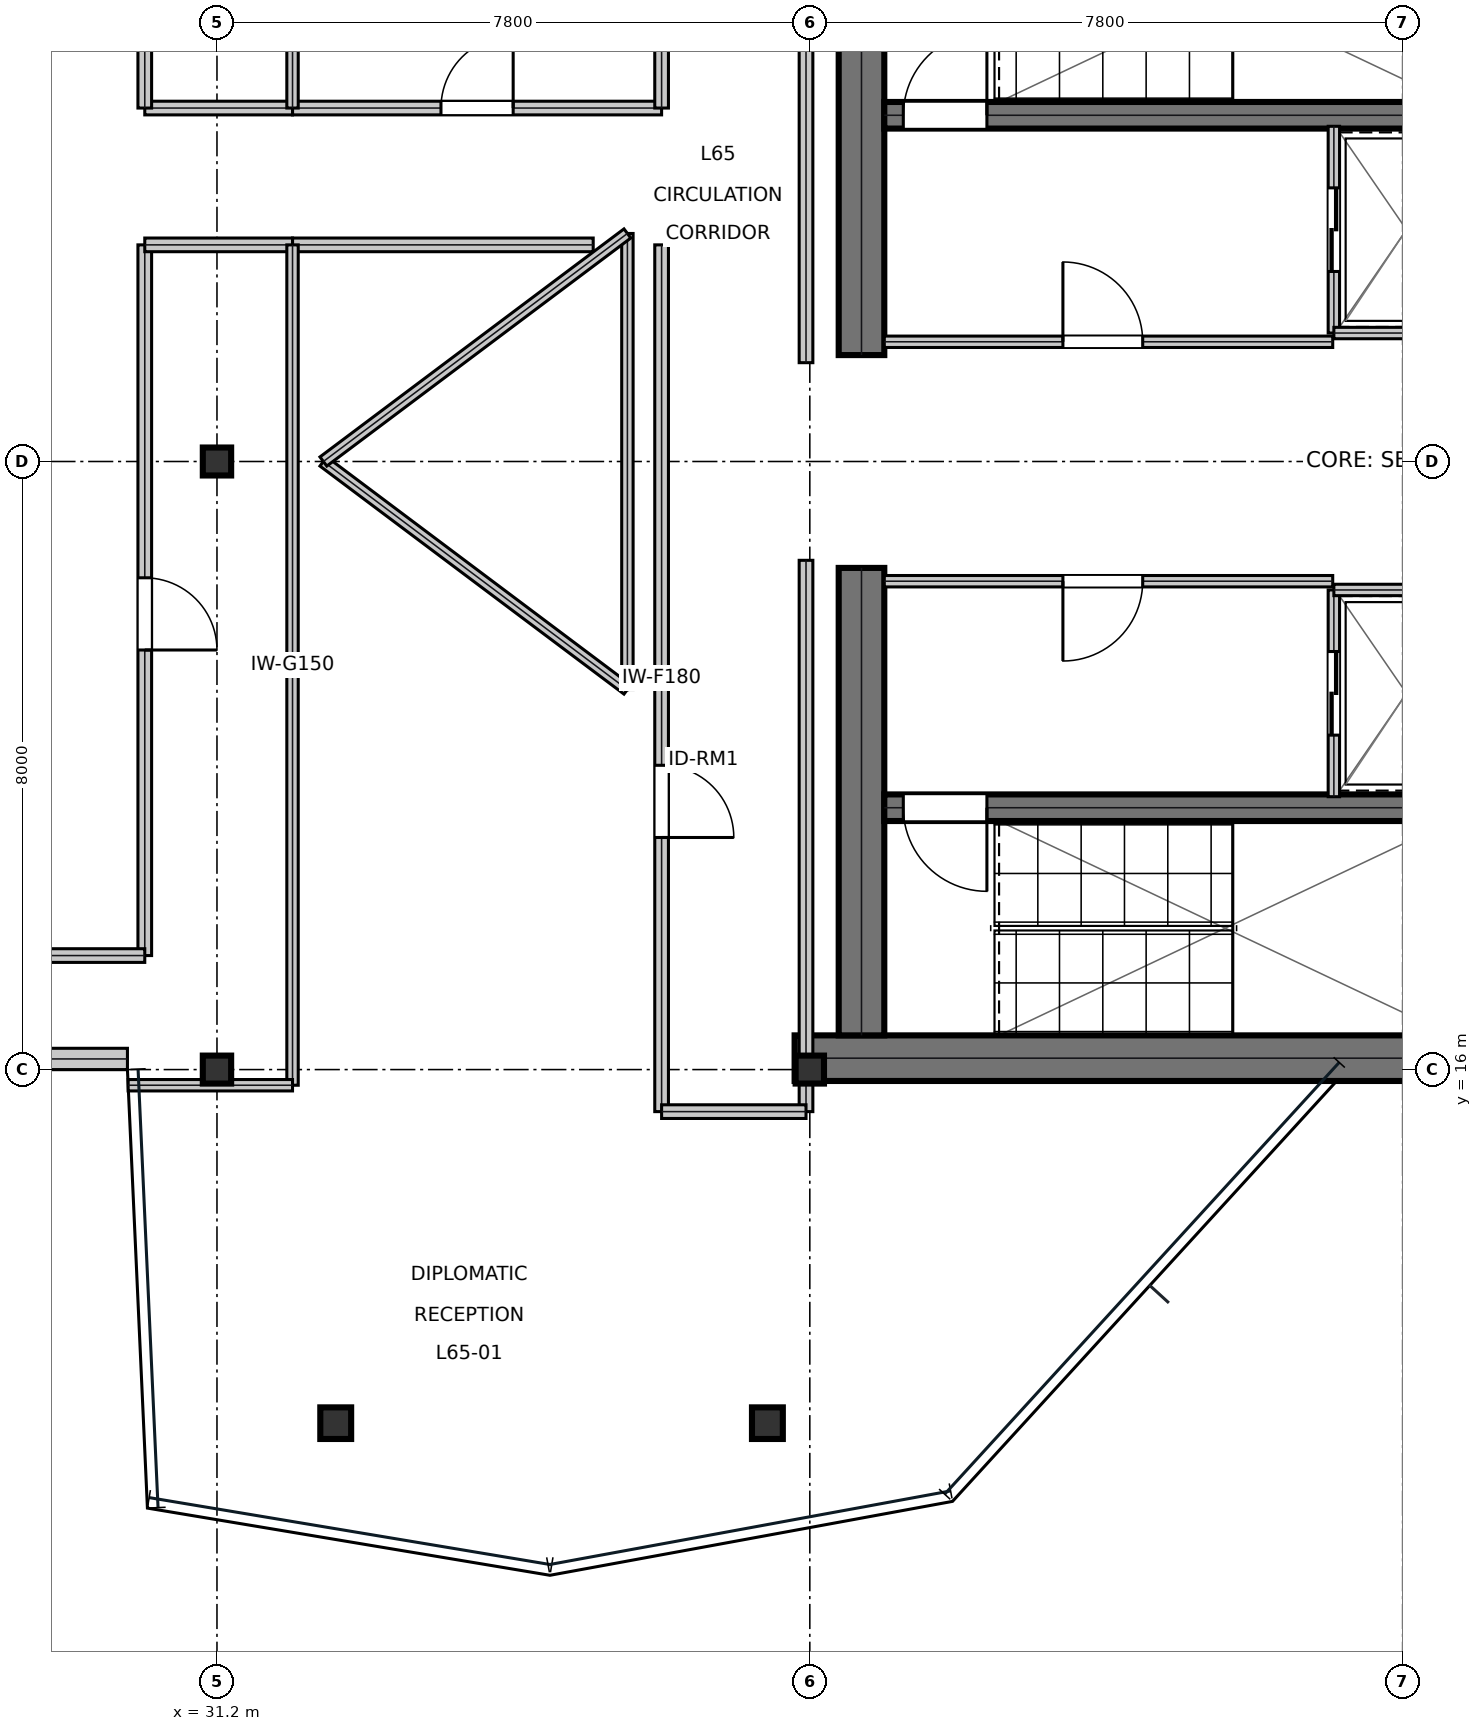
"""IFC4 building model, lengths in metres.
Left out: names, types, materials, properties, quantities, classifications, styles, units other than length and angle.
Written with IfcOpenShell. Run it as: python <this file> out.ifc"""

import sys

from ifc_helpers import new_model, si_unit, direction, frame, frame_2d, origin, origin_2d, place, context, subcontext, project, spatial, rectangle, i_section, extrude, element, fill, save


model = new_model("IFC4")
c1 = context("Model", 3, precision=1e-05, world=origin(), true_north=direction((0.0, 1.0)))
c2 = subcontext(c1, "Body", "Model", "MODEL_VIEW")
j1 = project(units=[si_unit("LENGTHUNIT", "METRE"), si_unit("PLANEANGLEUNIT", "RADIAN")], contexts=[c1])
p1 = place(None, origin())
s1 = spatial("IfcSite", under=j1, at=p1, CompositionType="ELEMENT")
p2 = place(p1, origin())
s2 = spatial("IfcBuilding", under=s1, at=p2, CompositionType="ELEMENT")
p3 = place(p2, frame((0.0, 0.0, 279.0)))
s3 = spatial("IfcBuildingStorey", under=s2, at=p3, CompositionType="ELEMENT", Elevation=279.0)
p4 = place(p3, frame((38.8, 16.15, 0.0), z_axis=(0.0, 0.0, 1.0), x_axis=(1.0, 0.0, 0.0)))
e1 = element("IfcWall", 1, at=p4, inside=s3, PredefinedType="SHEAR", context=c2, shape_type="SweptSolid", body=[
    extrude(rectangle(XDim=16.0, YDim=0.6, at=frame_2d((8.0, 0.0))), origin(), (0.0, 0.0, 1.0), 3.81),
])
for number, where, z_axis, x_axis in (
    (2, (39.68, 16.45, 0.0), (0.0, 0.0, 1.0), (0.0, 1.0, 0.0)),
    (3, (39.68, 25.4, 0.0), (0.0, 0.0, 1.0), (0.0, 1.0, 0.0)),
):
    element("IfcWall", number, at=place(p3, frame(where, z_axis=z_axis, x_axis=x_axis)), inside=s3, PredefinedType="SHEAR", context=c2, shape_type="SweptSolid", body=[
        extrude(rectangle(XDim=6.15, YDim=0.6, at=frame_2d((3.075, 0.0))), origin(), (0.0, 0.0, 1.0), 3.81),
    ])
p5 = place(p3, frame((39.98, 28.555, 0.0), z_axis=(0.0, 0.0, 1.0), x_axis=(1.0, 0.0, 0.0)))
e4 = element("IfcWall", 4, at=p5, inside=s3, PredefinedType="SHEAR", context=c2, shape_type="SweptSolid", body=[
    extrude(rectangle(XDim=7.71, YDim=0.35, at=frame_2d((3.855, 0.0))), origin(), (0.0, 0.0, 1.0), 3.81),
])
p6 = place(p5, frame((0.25, 0.0, 0.0)))
e5 = element("IfcOpeningElement", 5, at=p6, cuts=e4, PredefinedType="OPENING", context=c2, shape_type="SweptSolid", body=[
    extrude(rectangle(XDim=1.1, YDim=2.15, at=frame_2d((0.55, 1.075))), frame((0.0, 0.185, 0.0), z_axis=(0.0, -1.0, 0.0), x_axis=(1.0, 0.0, 0.0)), (0.0, 0.0, 1.0), 0.37),
])
p7 = place(p3, frame((39.98, 19.445, 0.0), z_axis=(0.0, 0.0, 1.0), x_axis=(1.0, 0.0, 0.0)))
e6 = element("IfcWall", 6, at=p7, inside=s3, PredefinedType="SHEAR", context=c2, shape_type="SweptSolid", body=[
    extrude(rectangle(XDim=7.71, YDim=0.35, at=frame_2d((3.855, 0.0))), origin(), (0.0, 0.0, 1.0), 3.81),
])
p8 = place(p7, frame((0.25, 0.0, 0.0)))
e7 = element("IfcOpeningElement", 7, at=p8, cuts=e6, PredefinedType="OPENING", context=c2, shape_type="SweptSolid", body=[
    extrude(rectangle(XDim=1.1, YDim=2.15, at=frame_2d((0.55, 1.075))), frame((0.0, 0.185, 0.0), z_axis=(0.0, -1.0, 0.0), x_axis=(1.0, 0.0, 0.0)), (0.0, 0.0, 1.0), 0.37),
])
for number, where, z_axis, x_axis in (
    (8, (31.2, 16.0, 0.0), (0.0, 0.0, 1.0), (1.0, 0.0, 0.0)),
    (9, (31.2, 24.0, 0.0), (0.0, 0.0, 1.0), (1.0, 0.0, 0.0)),
    (10, (39.0, 16.0, 0.0), (0.0, 0.0, 1.0), (1.0, 0.0, 0.0)),
):
    element("IfcColumn", number, at=place(p3, frame(where, z_axis=z_axis, x_axis=x_axis)), inside=s3, PredefinedType="COLUMN", context=c2, shape_type="SweptSolid", body=[
        extrude(i_section(OverallWidth=0.373, OverallDepth=0.368, WebThickness=0.015, FlangeThickness=0.024, at=origin_2d()), origin(), (0.0, 0.0, 1.0), 4.044),
    ])
for number, where, z_axis, x_axis in (
    (11, (32.762, 11.348, 0.016), (0.0, 0.0, 1.0), (1.0, 0.0, 0.0)),
    (12, (38.442, 11.348, 0.016), (0.0, 0.0, 1.0), (1.0, 0.0, 0.0)),
):
    element("IfcColumn", number, at=place(p3, frame(where, z_axis=z_axis, x_axis=x_axis)), inside=s3, PredefinedType="COLUMN", context=c2, shape_type="SweptSolid", body=[
        extrude(i_section(OverallWidth=0.406, OverallDepth=0.416, WebThickness=0.03, FlangeThickness=0.048, at=origin_2d()), origin(), (0.0, 0.0, 1.0), 4.018),
    ])
p9 = place(p3, frame((27.186, 16.14, 0.0), z_axis=(0.0, 0.0, 1.0), x_axis=(1.0, 0.0, 0.0)))
e13 = element("IfcWall", 13, at=p9, inside=s3, PredefinedType="STANDARD", context=c2, shape_type="SweptSolid", body=[
    extrude(rectangle(XDim=2.836, YDim=0.28, at=frame_2d((1.418, 0.0))), origin(), (0.0, 0.0, 1.0), 3.81),
])
p10 = place(p3, frame((39.98, 25.575, 0.0), z_axis=(0.0, 0.0, 1.0), x_axis=(1.0, 0.0, 0.0)))
e14 = element("IfcWall", 14, at=p10, inside=s3, PredefinedType="PARTITIONING", context=c2, shape_type="SweptSolid", body=[
    extrude(rectangle(XDim=5.9, YDim=0.15, at=frame_2d((2.95, 0.0))), origin(), (0.0, 0.0, 1.0), 3.81),
])
p11 = place(p10, frame((2.35, 0.0, 0.0)))
e15 = element("IfcOpeningElement", 15, at=p11, cuts=e14, PredefinedType="OPENING", context=c2, shape_type="SweptSolid", body=[
    extrude(rectangle(XDim=1.05, YDim=2.15, at=frame_2d((0.525, 1.075))), frame((0.0, 0.085, 0.0), z_axis=(0.0, -1.0, 0.0), x_axis=(1.0, 0.0, 0.0)), (0.0, 0.0, 1.0), 0.17),
])
p12 = place(p3, frame((39.98, 22.425, 0.0), z_axis=(0.0, 0.0, 1.0), x_axis=(1.0, 0.0, 0.0)))
e16 = element("IfcWall", 16, at=p12, inside=s3, PredefinedType="PARTITIONING", context=c2, shape_type="SweptSolid", body=[
    extrude(rectangle(XDim=5.9, YDim=0.15, at=frame_2d((2.95, 0.0))), origin(), (0.0, 0.0, 1.0), 3.81),
])
p13 = place(p12, frame((2.35, 0.0, 0.0)))
e17 = element("IfcOpeningElement", 17, at=p13, cuts=e16, PredefinedType="OPENING", context=c2, shape_type="SweptSolid", body=[
    extrude(rectangle(XDim=1.05, YDim=2.15, at=frame_2d((0.525, 1.075))), frame((0.0, 0.085, 0.0), z_axis=(0.0, -1.0, 0.0), x_axis=(1.0, 0.0, 0.0)), (0.0, 0.0, 1.0), 0.17),
])
p14 = place(p3, frame((45.895, 25.69, 0.0), z_axis=(0.0, 0.0, 1.0), x_axis=(0.0, 1.0, 0.0)))
e18 = element("IfcWall", 18, at=p14, inside=s3, PredefinedType="PARTITIONING", context=c2, shape_type="SweptSolid", body=[
    extrude(rectangle(XDim=2.72, YDim=0.15, at=frame_2d((1.36, 0.0))), origin(), (0.0, 0.0, 1.0), 3.81),
])
p15 = place(p14, frame((0.81, 0.0, 0.0)))
e19 = element("IfcOpeningElement", 19, at=p15, cuts=e18, PredefinedType="OPENING", context=c2, shape_type="SweptSolid", body=[
    extrude(rectangle(XDim=1.1, YDim=2.15, at=frame_2d((0.55, 1.075))), frame((0.0, 0.085, 0.0), z_axis=(0.0, -1.0, 0.0), x_axis=(1.0, 0.0, 0.0)), (0.0, 0.0, 1.0), 0.17),
])
p16 = place(p3, frame((45.895, 25.69, 0.0), z_axis=(0.0, 0.0, 1.0), x_axis=(1.0, 0.0, 0.0)))
e20 = element("IfcWall", 20, at=p16, inside=s3, PredefinedType="PARTITIONING", context=c2, shape_type="SweptSolid", body=[
    extrude(rectangle(XDim=1.915, YDim=0.15, at=frame_2d((0.958, 0.0))), origin(), (0.0, 0.0, 1.0), 3.81),
])
p17 = place(p3, frame((45.895, 19.59, 0.0), z_axis=(0.0, 0.0, 1.0), x_axis=(0.0, 1.0, 0.0)))
e21 = element("IfcWall", 21, at=p17, inside=s3, PredefinedType="PARTITIONING", context=c2, shape_type="SweptSolid", body=[
    extrude(rectangle(XDim=2.72, YDim=0.15, at=frame_2d((1.36, 0.0))), origin(), (0.0, 0.0, 1.0), 3.81),
])
p18 = place(p17, frame((0.81, 0.0, 0.0)))
e22 = element("IfcOpeningElement", 22, at=p18, cuts=e21, PredefinedType="OPENING", context=c2, shape_type="SweptSolid", body=[
    extrude(rectangle(XDim=1.1, YDim=2.15, at=frame_2d((0.55, 1.075))), frame((0.0, 0.085, 0.0), z_axis=(0.0, -1.0, 0.0), x_axis=(1.0, 0.0, 0.0)), (0.0, 0.0, 1.0), 0.17),
])
p19 = place(p3, frame((45.895, 22.31, 0.0), z_axis=(0.0, 0.0, 1.0), x_axis=(1.0, 0.0, 0.0)))
e23 = element("IfcWall", 23, at=p19, inside=s3, PredefinedType="PARTITIONING", context=c2, shape_type="SweptSolid", body=[
    extrude(rectangle(XDim=1.915, YDim=0.15, at=frame_2d((0.958, 0.0))), origin(), (0.0, 0.0, 1.0), 3.81),
])
p20 = place(p3, frame((37.05, 15.447, 0.0), z_axis=(0.0, 0.0, 1.0), x_axis=(0.0, 1.0, 0.0)))
e24 = element("IfcWall", 24, at=p20, inside=s3, PredefinedType="SOLIDWALL", context=c2, shape_type="SweptSolid", body=[
    extrude(rectangle(XDim=11.403, YDim=0.18, at=frame_2d((5.702, 0.0))), origin(), (0.0, 0.0, 1.0), 3.27),
])
p21 = place(p20, frame((3.607, 0.0, 0.0)))
e25 = element("IfcOpeningElement", 25, at=p21, cuts=e24, PredefinedType="OPENING", context=c2, shape_type="SweptSolid", body=[
    extrude(rectangle(XDim=0.95, YDim=2.15, at=frame_2d((0.475, 1.075))), frame((0.0, 0.1, 0.0), z_axis=(0.0, -1.0, 0.0), x_axis=(1.0, 0.0, 0.0)), (0.0, 0.0, 1.0), 0.2),
])
p22 = place(p3, frame((30.25, 17.5, 0.0), z_axis=(0.0, 0.0, 1.0), x_axis=(0.0, 1.0, 0.0)))
e26 = element("IfcWall", 26, at=p22, inside=s3, PredefinedType="SOLIDWALL", context=c2, shape_type="SweptSolid", body=[
    extrude(rectangle(XDim=9.35, YDim=0.18, at=frame_2d((4.675, 0.0))), origin(), (0.0, 0.0, 1.0), 3.27),
])
p23 = place(p22, frame((4.02, 0.0, 0.0)))
e27 = element("IfcOpeningElement", 27, at=p23, cuts=e26, PredefinedType="OPENING", context=c2, shape_type="SweptSolid", body=[
    extrude(rectangle(XDim=0.95, YDim=2.15, at=frame_2d((0.475, 1.075))), frame((0.0, 0.1, 0.0), z_axis=(0.0, -1.0, 0.0), x_axis=(1.0, 0.0, 0.0)), (0.0, 0.0, 1.0), 0.2),
])
p24 = place(p3, frame((32.194, 28.65, 0.0), z_axis=(0.0, 0.0, 1.0), x_axis=(1.0, 0.0, 0.0)))
e28 = element("IfcWall", 28, at=p24, inside=s3, PredefinedType="SOLIDWALL", context=c2, shape_type="SweptSolid", body=[
    extrude(rectangle(XDim=4.856, YDim=0.18, at=frame_2d((2.428, 0.0))), origin(), (0.0, 0.0, 1.0), 3.81),
])
p25 = place(p24, frame((1.953, 0.0, 0.0)))
e29 = element("IfcOpeningElement", 29, at=p25, cuts=e28, PredefinedType="OPENING", context=c2, shape_type="SweptSolid", body=[
    extrude(rectangle(XDim=0.95, YDim=2.15, at=frame_2d((0.475, 1.075))), frame((0.0, 0.1, 0.0), z_axis=(0.0, -1.0, 0.0), x_axis=(1.0, 0.0, 0.0)), (0.0, 0.0, 1.0), 0.2),
])
p26 = place(p3, frame((38.95, 15.447, 0.0), z_axis=(0.0, 0.0, 1.0), x_axis=(0.0, 1.0, 0.0)))
e30 = element("IfcWall", 30, at=p26, inside=s3, PredefinedType="SOLIDWALL", context=c2, shape_type="SweptSolid", body=[
    extrude(rectangle(XDim=7.253, YDim=0.18, at=frame_2d((3.626, 0.0))), origin(), (0.0, 0.0, 1.0), 3.27),
])
p27 = place(p3, frame((32.194, 26.85, 0.0), z_axis=(0.0, 0.0, 1.0), x_axis=(1.0, 0.0, 0.0)))
e31 = element("IfcWall", 31, at=p27, inside=s3, PredefinedType="SOLIDWALL", context=c2, shape_type="SweptSolid", body=[
    extrude(rectangle(XDim=3.956, YDim=0.18, at=frame_2d((1.978, 0.0))), origin(), (0.0, 0.0, 1.0), 3.81),
])
p28 = place(p3, frame((37.05, 15.447, 0.0), z_axis=(0.0, 0.0, 1.0), x_axis=(1.0, 0.0, 0.0)))
e32 = element("IfcWall", 32, at=p28, inside=s3, PredefinedType="SOLIDWALL", context=c2, shape_type="SweptSolid", body=[
    extrude(rectangle(XDim=1.9, YDim=0.18, at=frame_2d((0.95, 0.0))), origin(), (0.0, 0.0, 1.0), 3.27),
])
for number, where, z_axis, x_axis in (
    (33, (30.25, 26.85, 0.0), (0.0, 0.0, 1.0), (1.0, 0.0, 0.0)),
    (34, (30.25, 28.65, 0.0), (0.0, 0.0, 1.0), (1.0, 0.0, 0.0)),
):
    element("IfcWall", number, at=place(p3, frame(where, z_axis=z_axis, x_axis=x_axis)), inside=s3, PredefinedType="SOLIDWALL", context=c2, shape_type="SweptSolid", body=[
        extrude(rectangle(XDim=1.944, YDim=0.18, at=frame_2d((0.972, 0.0))), origin(), (0.0, 0.0, 1.0), 3.27),
    ])
p29 = place(p3, frame((30.25, 28.65, 0.0), z_axis=(0.0, 0.0, 1.0), x_axis=(0.0, 1.0, 0.0)))
e35 = element("IfcWall", 35, at=p29, inside=s3, PredefinedType="SOLIDWALL", context=c2, shape_type="SweptSolid", body=[
    extrude(rectangle(XDim=1.85, YDim=0.18, at=frame_2d((0.925, 0.0))), origin(), (0.0, 0.0, 1.0), 3.81),
])
p30 = place(p3, frame((28.55, 17.5, 0.0), z_axis=(0.0, 0.0, 1.0), x_axis=(1.0, 0.0, 0.0)))
e36 = element("IfcWall", 36, at=p30, inside=s3, PredefinedType="SOLIDWALL", context=c2, shape_type="SweptSolid", body=[
    extrude(rectangle(XDim=1.7, YDim=0.18, at=frame_2d((0.85, 0.0))), origin(), (0.0, 0.0, 1.0), 3.81),
])
p31 = place(p3, frame((38.95, 25.3, 0.0), z_axis=(0.0, 0.0, 1.0), x_axis=(0.0, 1.0, 0.0)))
e37 = element("IfcWall", 37, at=p31, inside=s3, PredefinedType="SOLIDWALL", context=c2, shape_type="SweptSolid", body=[
    extrude(rectangle(XDim=7.253, YDim=0.18, at=frame_2d((3.626, 0.0))), origin(), (0.0, 0.0, 1.0), 3.27),
])
p32 = place(p3, frame((37.05, 28.65, 0.0), z_axis=(0.0, 0.0, 1.0), x_axis=(0.0, 1.0, 0.0)))
e38 = element("IfcWall", 38, at=p32, inside=s3, PredefinedType="SOLIDWALL", context=c2, shape_type="SweptSolid", body=[
    extrude(rectangle(XDim=3.903, YDim=0.18, at=frame_2d((1.952, 0.0))), origin(), (0.0, 0.0, 1.0), 3.27),
])
p33 = place(p3, frame((32.194, 15.794, 0.0), z_axis=(0.0, 0.0, 1.0), x_axis=(0.0, 1.0, 0.0)))
e39 = element("IfcWall", 39, at=p33, inside=s3, PredefinedType="MOVABLE", context=c2, shape_type="SweptSolid", body=[
    extrude(rectangle(XDim=11.056, YDim=0.15, at=frame_2d((5.528, 0.0))), origin(), (0.0, 0.0, 1.0), 3.27),
])
p34 = place(p3, frame((30.031, 15.794, 0.0), z_axis=(0.0, 0.0, 1.0), x_axis=(1.0, 0.0, 0.0)))
e40 = element("IfcWall", 40, at=p34, inside=s3, PredefinedType="MOVABLE", context=c2, shape_type="SweptSolid", body=[
    extrude(rectangle(XDim=2.163, YDim=0.15, at=frame_2d((1.081, 0.0))), origin(), (0.0, 0.0, 1.0), 3.27),
])
p35 = place(p3, frame((32.194, 28.65, 0.0), z_axis=(0.0, 0.0, 1.0), x_axis=(0.0, 1.0, 0.0)))
e41 = element("IfcWall", 41, at=p35, inside=s3, PredefinedType="MOVABLE", context=c2, shape_type="SweptSolid", body=[
    extrude(rectangle(XDim=2.384, YDim=0.15, at=frame_2d((1.192, 0.0))), origin(), (0.0, 0.0, 1.0), 3.54),
])
p36 = place(p3, frame((32.6, 24.0, 0.0), z_axis=(0.0, 0.0, 1.0), x_axis=(0.8, -0.6, 0.0)))
e42 = element("IfcWall", 42, at=p36, inside=s3, PredefinedType="MOVABLE", context=c2, shape_type="SweptSolid", body=[
    extrude(rectangle(XDim=5.0, YDim=0.15, at=frame_2d((2.5, 0.0))), origin(), (0.0, 0.0, 1.0), 3.81),
])
p37 = place(p3, frame((36.6, 21.0, 0.0), z_axis=(0.0, 0.0, 1.0), x_axis=(0.0, 1.0, 0.0)))
e43 = element("IfcWall", 43, at=p37, inside=s3, PredefinedType="MOVABLE", context=c2, shape_type="SweptSolid", body=[
    extrude(rectangle(XDim=6.0, YDim=0.15, at=frame_2d((3.0, 0.0))), origin(), (0.0, 0.0, 1.0), 3.81),
])
p38 = place(p3, frame((36.6, 27.0, 0.0), z_axis=(0.0, 0.0, 1.0), x_axis=(-0.8, -0.6, 0.0)))
e44 = element("IfcWall", 44, at=p38, inside=s3, PredefinedType="MOVABLE", context=c2, shape_type="SweptSolid", body=[
    extrude(rectangle(XDim=5.0, YDim=0.15, at=frame_2d((2.5, 0.0))), origin(), (0.0, 0.0, 1.0), 3.81),
])
p39 = place(p11, origin())
e45 = element("IfcDoor", 45, at=p39, inside=s3, OperationType="SINGLE_SWING_LEFT", PredefinedType="DOOR", context=c2, shape_type="SweptSolid", body=[
    extrude(rectangle(XDim=1.05, YDim=2.15, at=frame_2d((0.525, 1.075))), frame((0.0, 0.025, 0.0), z_axis=(0.0, -1.0, 0.0), x_axis=(1.0, 0.0, 0.0)), (0.0, 0.0, 1.0), 0.05),
])
fill(e15, e45)
p40 = place(p13, frame((1.05, 0.0, 0.0), z_axis=(0.0, 0.0, 1.0), x_axis=(-1.0, 0.0, 0.0)))
e46 = element("IfcDoor", 46, at=p40, inside=s3, OperationType="SINGLE_SWING_RIGHT", PredefinedType="DOOR", context=c2, shape_type="SweptSolid", body=[
    extrude(rectangle(XDim=1.05, YDim=2.15, at=frame_2d((0.525, 1.075))), frame((0.0, 0.025, 0.0), z_axis=(0.0, -1.0, 0.0), x_axis=(1.0, 0.0, 0.0)), (0.0, 0.0, 1.0), 0.05),
])
fill(e17, e46)
p41 = place(p15, frame((1.1, 0.0, 0.0), z_axis=(0.0, 0.0, 1.0), x_axis=(-1.0, 0.0, 0.0)))
e47 = element("IfcDoor", 47, at=p41, inside=s3, OperationType="DOUBLE_DOOR_SLIDING", PredefinedType="DOOR", context=c2, shape_type="SweptSolid", body=[
    extrude(rectangle(XDim=1.1, YDim=2.15, at=frame_2d((0.55, 1.075))), frame((0.0, 0.025, 0.0), z_axis=(0.0, -1.0, 0.0), x_axis=(1.0, 0.0, 0.0)), (0.0, 0.0, 1.0), 0.05),
])
fill(e19, e47)
p42 = place(p18, frame((1.1, 0.0, 0.0), z_axis=(0.0, 0.0, 1.0), x_axis=(-1.0, 0.0, 0.0)))
e48 = element("IfcDoor", 48, at=p42, inside=s3, OperationType="DOUBLE_DOOR_SLIDING", PredefinedType="DOOR", context=c2, shape_type="SweptSolid", body=[
    extrude(rectangle(XDim=1.1, YDim=2.15, at=frame_2d((0.55, 1.075))), frame((0.0, 0.025, 0.0), z_axis=(0.0, -1.0, 0.0), x_axis=(1.0, 0.0, 0.0)), (0.0, 0.0, 1.0), 0.05),
])
fill(e22, e48)
p43 = place(p21, frame((0.95, 0.0, 0.0), z_axis=(0.0, 0.0, 1.0), x_axis=(-1.0, 0.0, 0.0)))
e49 = element("IfcDoor", 49, at=p43, inside=s3, OperationType="SINGLE_SWING_RIGHT", PredefinedType="DOOR", context=c2, shape_type="SweptSolid", body=[
    extrude(rectangle(XDim=0.95, YDim=2.15, at=frame_2d((0.475, 1.075))), frame((0.0, 0.025, 0.0), z_axis=(0.0, -1.0, 0.0), x_axis=(1.0, 0.0, 0.0)), (0.0, 0.0, 1.0), 0.05),
])
fill(e25, e49)
p44 = place(p23, frame((0.95, 0.0, 0.0), z_axis=(0.0, 0.0, 1.0), x_axis=(-1.0, 0.0, 0.0)))
e50 = element("IfcDoor", 50, at=p44, inside=s3, OperationType="SINGLE_SWING_RIGHT", PredefinedType="DOOR", context=c2, shape_type="SweptSolid", body=[
    extrude(rectangle(XDim=0.95, YDim=2.15, at=frame_2d((0.475, 1.075))), frame((0.0, 0.025, 0.0), z_axis=(0.0, -1.0, 0.0), x_axis=(1.0, 0.0, 0.0)), (0.0, 0.0, 1.0), 0.05),
])
fill(e27, e50)
p45 = place(p25, origin())
e51 = element("IfcDoor", 51, at=p45, inside=s3, OperationType="SINGLE_SWING_RIGHT", PredefinedType="DOOR", context=c2, shape_type="SweptSolid", body=[
    extrude(rectangle(XDim=0.95, YDim=2.15, at=frame_2d((0.475, 1.075))), frame((0.0, 0.025, 0.0), z_axis=(0.0, -1.0, 0.0), x_axis=(1.0, 0.0, 0.0)), (0.0, 0.0, 1.0), 0.05),
])
fill(e29, e51)
p46 = place(p6, origin())
e52 = element("IfcDoor", 52, at=p46, inside=s3, OperationType="SINGLE_SWING_RIGHT", PredefinedType="DOOR", context=c2, shape_type="SweptSolid", body=[
    extrude(rectangle(XDim=1.1, YDim=2.15, at=frame_2d((0.55, 1.075))), frame((0.0, 0.025, 0.0), z_axis=(0.0, -1.0, 0.0), x_axis=(1.0, 0.0, 0.0)), (0.0, 0.0, 1.0), 0.05),
])
fill(e5, e52)
p47 = place(p8, frame((1.1, 0.0, 0.0), z_axis=(0.0, 0.0, 1.0), x_axis=(-1.0, 0.0, 0.0)))
e53 = element("IfcDoor", 53, at=p47, inside=s3, OperationType="SINGLE_SWING_LEFT", PredefinedType="DOOR", context=c2, shape_type="SweptSolid", body=[
    extrude(rectangle(XDim=1.1, YDim=2.15, at=frame_2d((0.55, 1.075))), frame((0.0, 0.025, 0.0), z_axis=(0.0, -1.0, 0.0), x_axis=(1.0, 0.0, 0.0)), (0.0, 0.0, 1.0), 0.05),
])
fill(e7, e53)
save(model, sys.argv[1])
